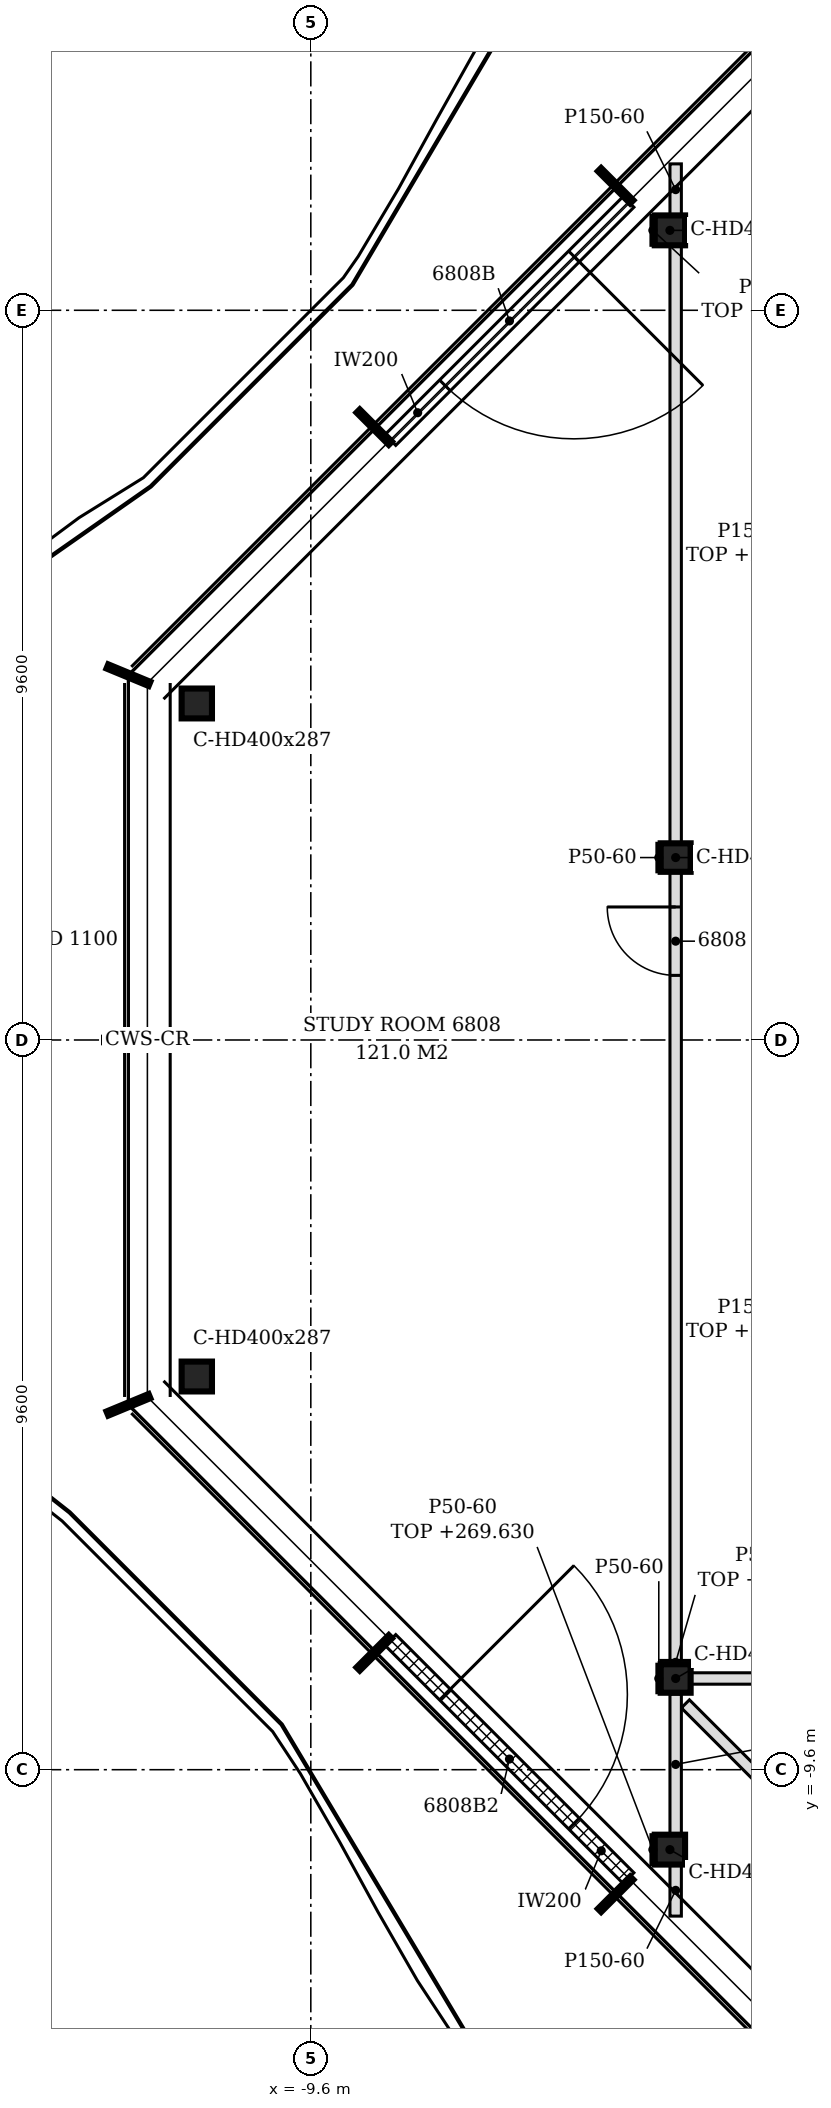
"""IFC4 building model, lengths in metres.
Left out: names, types, materials, properties, quantities, classifications, styles, units other than length and angle.
Written with IfcOpenShell. Run it as: python <this file> out.ifc"""

import sys

from ifc_helpers import new_model, si_unit, direction, frame, frame_2d, origin, origin_2d, place, context, subcontext, project, spatial, polyline, rectangle, i_section, outline, extrude, element, fill, save


model = new_model("IFC4")
c1 = context("Model", 3, precision=1e-05, world=origin(), true_north=direction((0.0, 1.0)))
c2 = subcontext(c1, "Body", "Model", "MODEL_VIEW")
j1 = project(units=[si_unit("LENGTHUNIT", "METRE"), si_unit("PLANEANGLEUNIT", "RADIAN")], contexts=[c1])
p1 = place(None, origin())
s1 = spatial("IfcSite", under=j1, at=p1, CompositionType="ELEMENT")
p2 = place(p1, origin())
s2 = spatial("IfcBuilding", under=s1, at=p2, CompositionType="ELEMENT")
p3 = place(p2, frame((0.0, 0.0, 267.0)))
s3 = spatial("IfcBuildingStorey", under=s2, at=p3, CompositionType="ELEMENT", Elevation=267.0)
for number, where, z_axis, x_axis in (
    (1, (-4.876, 10.652, -0.15), (0.0, 0.0, 1.0), (1.0, 0.0, 0.0)),
    (2, (-11.1, 4.427, -0.15), (0.0, 0.0, 1.0), (1.0, 0.0, 0.0)),
    (3, (-11.1, -4.427, -0.15), (0.0, 0.0, 1.0), (1.0, 0.0, 0.0)),
    (4, (-4.876, -10.652, -0.15), (0.0, 0.0, 1.0), (1.0, 0.0, 0.0)),
):
    element("IfcColumn", number, at=place(p3, frame(where, z_axis=z_axis, x_axis=x_axis)), inside=s3, PredefinedType="COLUMN", context=c2, shape_type="SweptSolid", body=[
        extrude(i_section(OverallWidth=0.399, OverallDepth=0.393, WebThickness=0.023, FlangeThickness=0.037, FilletRadius=0.015, at=origin_2d()), origin(), (0.0, 0.0, 1.0), 3.6),
    ])
for number, where, z_axis, x_axis in (
    (5, (-4.8, -8.4, -0.15), (0.0, 0.0, 1.0), (1.0, 0.0, 0.0)),
    (6, (-4.8, 2.4, -0.15), (0.0, 0.0, 1.0), (1.0, 0.0, 0.0)),
):
    element("IfcColumn", number, at=place(p3, frame(where, z_axis=z_axis, x_axis=x_axis)), inside=s3, PredefinedType="COLUMN", context=c2, shape_type="SweptSolid", body=[
        extrude(i_section(OverallWidth=0.394, OverallDepth=0.375, WebThickness=0.017, FlangeThickness=0.028, FilletRadius=0.015, at=origin_2d()), origin(), (0.0, 0.0, 1.0), 3.6),
    ])
p4 = place(p3, frame((-5.42, 11.026, 0.0), z_axis=(0.0, 0.0, 1.0), x_axis=(-0.707134329907, -0.707079231393, 0.0)))
e7 = element("IfcWall", 7, at=p4, inside=s3, PredefinedType="NOTDEFINED", context=c2, shape_type="SweptSolid", body=[
    extrude(rectangle(XDim=4.431, YDim=0.2, at=frame_2d((2.215, 0.0))), origin(), (0.0, 0.0, 1.0), 3.45),
])
p5 = place(p4, frame((1.015, 0.0, 0.0)))
e8 = element("IfcOpeningElement", 8, at=p5, cuts=e7, PredefinedType="OPENING", context=c2, shape_type="SweptSolid", body=[
    extrude(rectangle(XDim=2.4, YDim=2.4, at=frame_2d((1.2, 1.2))), frame((0.0, 0.11, 0.0), z_axis=(0.0, -1.0, 0.0), x_axis=(1.0, 0.0, 0.0)), (0.0, 0.0, 1.0), 0.22),
])
p6 = place(p3, frame((-8.553, -7.893, 0.0), z_axis=(0.0, 0.0, 1.0), x_axis=(0.707134329907, -0.707079231393, 0.0)))
e9 = element("IfcWall", 9, at=p6, inside=s3, PredefinedType="NOTDEFINED", context=c2, shape_type="SweptSolid", body=[
    extrude(rectangle(XDim=4.431, YDim=0.2, at=frame_2d((2.215, 0.0))), origin(), (0.0, 0.0, 1.0), 3.45),
])
p7 = place(p6, frame((1.015, 0.0, 0.0)))
e10 = element("IfcOpeningElement", 10, at=p7, cuts=e9, PredefinedType="OPENING", context=c2, shape_type="SweptSolid", body=[
    extrude(rectangle(XDim=2.4, YDim=2.4, at=frame_2d((1.2, 1.2))), frame((0.0, 0.11, 0.0), z_axis=(0.0, -1.0, 0.0), x_axis=(1.0, 0.0, 0.0)), (0.0, 0.0, 1.0), 0.22),
])
p8 = place(p3, frame((0.866, -14.272, 0.0), z_axis=(0.0, 0.0, 1.0), x_axis=(-0.707106781187, 0.707106781187, 0.0)))
e11 = element("IfcWall", 11, at=p8, inside=s3, PredefinedType="PARTITIONING", context=c2, shape_type="SweptSolid", body=[
    extrude(rectangle(XDim=7.832, YDim=0.15, at=frame_2d((3.916, 0.0))), origin(), (0.0, 0.0, 1.0), 2.98),
])
p9 = place(p3, frame((-4.8, -11.526, 0.0), z_axis=(0.0, 0.0, 1.0), x_axis=(0.0, 1.0, 0.0)))
e12 = element("IfcWall", 12, at=p9, inside=s3, PredefinedType="PARTITIONING", context=c2, shape_type="SweptSolid", body=[
    extrude(outline(polyline([(0.0, 0.0), (0.678, 0.0), (0.678, 2.63), (0.229, 2.63), (0.227, 3.45), (0.0, 3.45), (0.0, 0.0)])), frame((0.0, 0.075, 0.0), z_axis=(0.0, -1.0, 0.0), x_axis=(1.0, 0.0, 0.0)), (0.0, 0.0, 1.0), 0.15),
])
p10 = place(p3, frame((-4.8, -10.455, 0.0), z_axis=(0.0, 0.0, 1.0), x_axis=(0.0, 1.0, 0.0)))
e13 = element("IfcWall", 13, at=p10, inside=s3, PredefinedType="PARTITIONING", context=c2, shape_type="SweptSolid", body=[
    extrude(outline(polyline([(0.0, 0.0), (1.849, 0.0), (1.849, 3.03), (0.298, 3.03), (0.296, 2.63), (0.058, 2.63), (0.056, 3.03), (0.0, 3.03), (0.0, 0.0)])), frame((0.0, 0.075, 0.0), z_axis=(0.0, -1.0, 0.0), x_axis=(1.0, 0.0, 0.0)), (0.0, 0.0, 1.0), 0.15),
])
p11 = place(p3, frame((-4.603, -8.4, 0.0), z_axis=(0.0, 0.0, 1.0), x_axis=(1.0, 0.0, 0.0)))
e14 = element("IfcWall", 14, at=p11, inside=s3, PredefinedType="PARTITIONING", context=c2, shape_type="SweptSolid", body=[
    extrude(rectangle(XDim=9.478, YDim=0.15, at=frame_2d((4.739, 0.0))), origin(), (0.0, 0.0, 1.0), 2.83),
])
p12 = place(p11, frame((4.153, 0.0, 0.0)))
e15 = element("IfcOpeningElement", 15, at=p12, cuts=e14, PredefinedType="OPENING", context=c2, shape_type="SweptSolid", body=[
    extrude(rectangle(XDim=0.9, YDim=2.1, at=frame_2d((0.45, 1.05))), frame((0.0, 0.085, 0.0), z_axis=(0.0, -1.0, 0.0), x_axis=(1.0, 0.0, 0.0)), (0.0, 0.0, 1.0), 0.17),
])
p13 = place(p3, frame((-4.8, -8.212, 0.0), z_axis=(0.0, 0.0, 1.0), x_axis=(0.0, 1.0, 0.0)))
e16 = element("IfcWall", 16, at=p13, inside=s3, PredefinedType="PARTITIONING", context=c2, shape_type="SweptSolid", body=[
    extrude(rectangle(XDim=10.425, YDim=0.15, at=frame_2d((5.212, 0.0))), origin(), (0.0, 0.0, 1.0), 2.83),
])
p14 = place(p13, frame((9.062, 0.0, 0.0)))
e17 = element("IfcOpeningElement", 17, at=p14, cuts=e16, PredefinedType="OPENING", context=c2, shape_type="SweptSolid", body=[
    extrude(rectangle(XDim=0.9, YDim=2.1, at=frame_2d((0.45, 1.05))), frame((0.0, 0.085, 0.0), z_axis=(0.0, -1.0, 0.0), x_axis=(1.0, 0.0, 0.0)), (0.0, 0.0, 1.0), 0.17),
])
p15 = place(p3, frame((-4.8, 2.587, 0.0), z_axis=(0.0, 0.0, 1.0), x_axis=(0.0, 1.0, 0.0)))
e18 = element("IfcWall", 18, at=p15, inside=s3, PredefinedType="PARTITIONING", context=c2, shape_type="SweptSolid", body=[
    extrude(outline(polyline([(0.0, 0.0), (7.868, 0.0), (7.867, 2.93), (7.809, 2.93), (7.807, 2.63), (7.57, 2.63), (7.568, 2.93), (0.0, 2.93), (0.0, 0.0)])), frame((0.0, 0.075, 0.0), z_axis=(0.0, -1.0, 0.0), x_axis=(1.0, 0.0, 0.0)), (0.0, 0.0, 1.0), 0.15),
])
p16 = place(p3, frame((-4.8, 10.848, 0.0), z_axis=(0.0, 0.0, 1.0), x_axis=(0.0, 1.0, 0.0)))
e19 = element("IfcWall", 19, at=p16, inside=s3, PredefinedType="PARTITIONING", context=c2, shape_type="SweptSolid", body=[
    extrude(outline(polyline([(0.0, 0.0), (0.678, 0.0), (0.678, 3.45), (0.449, 3.45), (0.447, 2.63), (0.0, 2.63), (0.0, 0.0)])), frame((0.0, 0.075, 0.0), z_axis=(0.0, -1.0, 0.0), x_axis=(1.0, 0.0, 0.0)), (0.0, 0.0, 1.0), 0.15),
])
p17 = place(p3, frame((-5.1, -10.848, 0.0), z_axis=(0.0, 0.0, 1.0), x_axis=(0.0, 1.0, 0.0)))
e20 = element("IfcWall", 20, at=p17, inside=s3, PredefinedType="PARTITIONING", context=c2, shape_type="SweptSolid", body=[
    extrude(rectangle(XDim=0.393, YDim=0.05, at=frame_2d((0.196, 0.0))), origin(), (0.0, 0.0, 1.0), 2.63),
])
for number, where, z_axis, x_axis in (
    (21, (-5.022, -8.587, 0.0), (0.0, 0.0, 1.0), (0.0, 1.0, 0.0)),
    (22, (-5.022, 2.212, 0.0), (0.0, 0.0, 1.0), (0.0, 1.0, 0.0)),
):
    element("IfcWall", number, at=place(p3, frame(where, z_axis=z_axis, x_axis=x_axis)), inside=s3, PredefinedType="PARTITIONING", context=c2, shape_type="SweptSolid", body=[
        extrude(rectangle(XDim=0.375, YDim=0.05, at=frame_2d((0.188, 0.0))), origin(), (0.0, 0.0, 1.0), 3.45),
    ])
p18 = place(p3, frame((-5.1, 10.455, 0.0), z_axis=(0.0, 0.0, 1.0), x_axis=(0.0, 1.0, 0.0)))
e23 = element("IfcWall", 23, at=p18, inside=s3, PredefinedType="PARTITIONING", context=c2, shape_type="SweptSolid", body=[
    extrude(rectangle(XDim=0.393, YDim=0.05, at=frame_2d((0.196, 0.0))), origin(), (0.0, 0.0, 1.0), 2.63),
])
p19 = place(p3, frame((-4.997, -8.188, 0.0), z_axis=(0.0, 0.0, 1.0), x_axis=(1.0, 0.0, 0.0)))
e24 = element("IfcWall", 24, at=p19, inside=s3, PredefinedType="PARTITIONING", context=c2, shape_type="SweptSolid", body=[
    extrude(rectangle(XDim=0.394, YDim=0.05, at=frame_2d((0.197, 0.0))), origin(), (0.0, 0.0, 1.0), 2.83),
])
p20 = place(p5, origin())
e25 = element("IfcDoor", 25, at=p20, inside=s3, OperationType="SINGLE_SWING_LEFT", PredefinedType="DOOR", context=c2, shape_type="SweptSolid", body=[
    extrude(rectangle(XDim=2.4, YDim=2.4, at=frame_2d((1.2, 1.2))), frame((0.0, 0.025, 0.0), z_axis=(0.0, -1.0, 0.0), x_axis=(1.0, 0.0, 0.0)), (0.0, 0.0, 1.0), 0.05),
])
fill(e8, e25)
p21 = place(p7, origin())
e26 = element("IfcDoor", 26, at=p21, inside=s3, OperationType="SINGLE_SWING_LEFT", PredefinedType="DOOR", context=c2, shape_type="SweptSolid", body=[
    extrude(rectangle(XDim=2.4, YDim=2.4, at=frame_2d((1.2, 1.2))), frame((0.0, 0.025, 0.0), z_axis=(0.0, -1.0, 0.0), x_axis=(1.0, 0.0, 0.0)), (0.0, 0.0, 1.0), 0.05),
])
fill(e10, e26)
p22 = place(p14, origin())
e27 = element("IfcDoor", 27, at=p22, inside=s3, OperationType="SINGLE_SWING_RIGHT", PredefinedType="DOOR", context=c2, shape_type="SweptSolid", body=[
    extrude(rectangle(XDim=0.9, YDim=2.1, at=frame_2d((0.45, 1.05))), frame((0.0, 0.025, 0.0), z_axis=(0.0, -1.0, 0.0), x_axis=(1.0, 0.0, 0.0)), (0.0, 0.0, 1.0), 0.05),
])
fill(e17, e27)
save(model, sys.argv[1])
